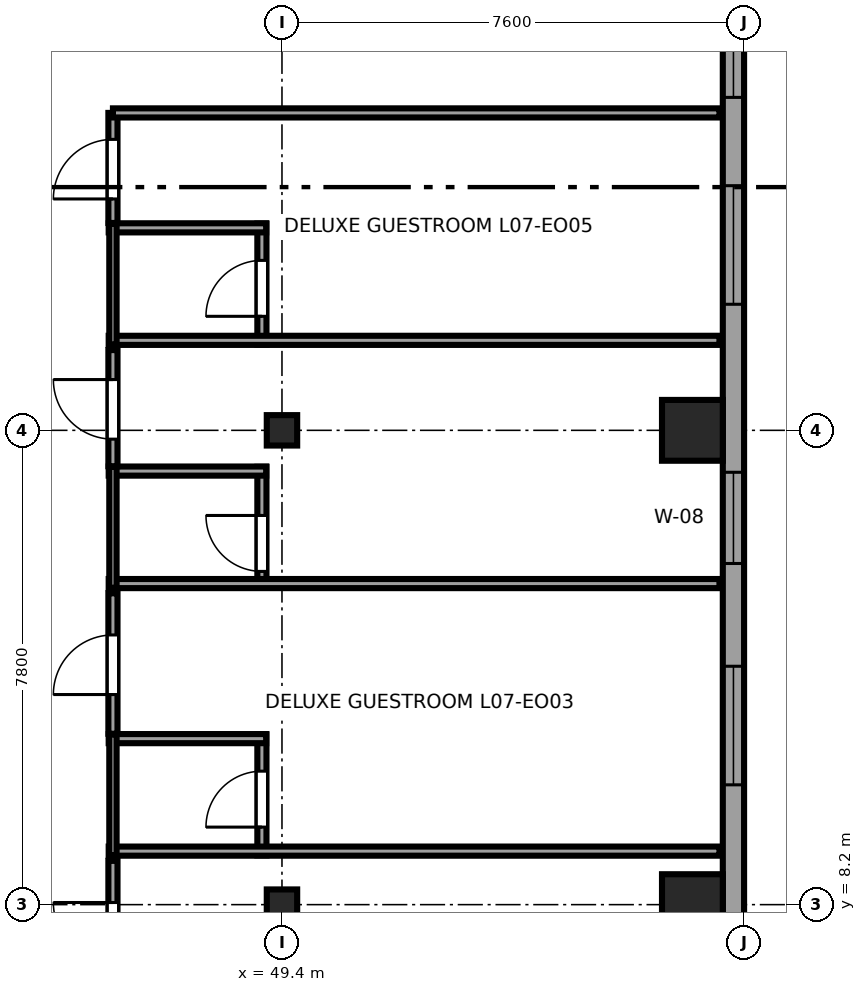
"""IFC4 building model, lengths in metres.
Left out: names, types, materials, properties, quantities, classifications, styles, units other than length and angle.
Written with IfcOpenShell. Run it as: python <this file> out.ifc"""

import sys

from ifc_helpers import new_model, si_unit, direction, frame, frame_2d, origin, origin_2d, place, context, subcontext, project, spatial, rectangle, i_section, extrude, source, transform, mapped, element, fill, save


model = new_model("IFC4")
c1 = context("Model", 3, precision=1e-05, world=origin(), true_north=direction((0.0, 1.0)))
c2 = subcontext(c1, "Body", "Model", "MODEL_VIEW")
j1 = project(units=[si_unit("LENGTHUNIT", "METRE"), si_unit("PLANEANGLEUNIT", "RADIAN")], contexts=[c1])
p1 = place(None, origin())
s1 = spatial("IfcSite", under=j1, at=p1, CompositionType="ELEMENT")
p2 = place(p1, origin())
s2 = spatial("IfcBuilding", under=s1, at=p2, CompositionType="ELEMENT")
p3 = place(p2, frame((0.0, 0.0, 35.55)))
s3 = spatial("IfcBuildingStorey", under=s2, at=p3, CompositionType="ELEMENT", Elevation=35.55)
m1 = source(origin(), c2, "Body", "SweptSolid", [
    extrude(i_section(OverallWidth=0.5, OverallDepth=0.5, WebThickness=0.028, FlangeThickness=0.045, at=origin_2d()), origin(), (0.0, 0.0, 1.0), 3.55),
])
for number, where, z_axis, x_axis in (
    (1, (49.4, 8.2, 0.0), (0.0, 0.0, 1.0), (1.0, 0.0, 0.0)),
    (2, (49.4, 16.0, 0.0), (0.0, 0.0, 1.0), (1.0, 0.0, 0.0)),
):
    element("IfcColumn", number, at=place(p3, frame(where, z_axis=z_axis, x_axis=x_axis)), inside=s3, PredefinedType="COLUMN", context=c2, shape_type="MappedRepresentation", body=[
        mapped(m1, transform((0.0, 0.0, 0.0), x_axis=(1.0, 0.0, 0.0), y_axis=(0.0, 1.0, 0.0), z_axis=(0.0, 0.0, 1.0), scale=1.0)),
    ])
m2 = source(origin(), c2, "Body", "SweptSolid", [
    extrude(rectangle(XDim=1.0, YDim=1.0, at=origin_2d()), origin(), (0.0, 0.0, 1.0), 3.55),
])
for number, where, z_axis, x_axis in (
    (3, (56.15, 8.2, 0.0), (0.0, 0.0, 1.0), (1.0, 0.0, 0.0)),
    (4, (56.15, 16.0, 0.0), (0.0, 0.0, 1.0), (1.0, 0.0, 0.0)),
):
    element("IfcColumn", number, at=place(p3, frame(where, z_axis=z_axis, x_axis=x_axis)), inside=s3, PredefinedType="COLUMN", context=c2, shape_type="MappedRepresentation", body=[
        mapped(m2, transform((0.0, 0.0, 0.0), x_axis=(1.0, 0.0, 0.0), y_axis=(0.0, 1.0, 0.0), z_axis=(0.0, 0.0, 1.0), scale=1.0)),
    ])
p4 = place(p3, frame((56.825, 4.617, 0.0), z_axis=(0.0, 0.0, 1.0), x_axis=(0.0, 1.0, 0.0)))
e5 = element("IfcWall", 5, at=p4, inside=s3, PredefinedType="SOLIDWALL", context=c2, shape_type="SweptSolid", body=[
    extrude(rectangle(XDim=36.766, YDim=0.35, at=frame_2d((18.383, 0.0))), origin(), (0.0, 0.0, 1.0), 3.37),
])
p5 = place(p4, frame((0.551, 0.0, 0.68)))
e6 = element("IfcOpeningElement", 6, at=p5, cuts=e5, PredefinedType="OPENING", context=c2, shape_type="SweptSolid", body=[
    extrude(rectangle(XDim=1.95, YDim=1.82, at=frame_2d((0.975, 0.91))), frame((0.0, 0.185, 0.0), z_axis=(0.0, -1.0, 0.0), x_axis=(1.0, 0.0, 0.0)), (0.0, 0.0, 1.0), 0.37),
])
p6 = place(p4, frame((5.553, 0.0, 0.68)))
e7 = element("IfcOpeningElement", 7, at=p6, cuts=e5, PredefinedType="OPENING", context=c2, shape_type="SweptSolid", body=[
    extrude(rectangle(XDim=1.95, YDim=1.82, at=frame_2d((0.975, 0.91))), frame((0.0, 0.185, 0.0), z_axis=(0.0, -1.0, 0.0), x_axis=(1.0, 0.0, 0.0)), (0.0, 0.0, 1.0), 0.37),
])
p7 = place(p4, frame((13.456, 0.0, 0.68)))
e8 = element("IfcOpeningElement", 8, at=p7, cuts=e5, PredefinedType="OPENING", context=c2, shape_type="SweptSolid", body=[
    extrude(rectangle(XDim=1.95, YDim=1.82, at=frame_2d((0.975, 0.91))), frame((0.0, 0.185, 0.0), z_axis=(0.0, -1.0, 0.0), x_axis=(1.0, 0.0, 0.0)), (0.0, 0.0, 1.0), 0.37),
])
p8 = place(p4, frame((16.858, 0.0, 0.68)))
e9 = element("IfcOpeningElement", 9, at=p8, cuts=e5, PredefinedType="OPENING", context=c2, shape_type="SweptSolid", body=[
    extrude(rectangle(XDim=1.95, YDim=1.82, at=frame_2d((0.975, 0.91))), frame((0.0, 0.185, 0.0), z_axis=(0.0, -1.0, 0.0), x_axis=(1.0, 0.0, 0.0)), (0.0, 0.0, 1.0), 0.37),
])
p9 = place(p4, frame((25.861, 0.0, 0.68)))
e10 = element("IfcOpeningElement", 10, at=p9, cuts=e5, PredefinedType="OPENING", context=c2, shape_type="SweptSolid", body=[
    extrude(rectangle(XDim=1.95, YDim=1.82, at=frame_2d((0.975, 0.91))), frame((0.0, 0.185, 0.0), z_axis=(0.0, -1.0, 0.0), x_axis=(1.0, 0.0, 0.0)), (0.0, 0.0, 1.0), 0.37),
])
p10 = place(p4, frame((30.313, 0.0, 0.68)))
e11 = element("IfcOpeningElement", 11, at=p10, cuts=e5, PredefinedType="OPENING", context=c2, shape_type="SweptSolid", body=[
    extrude(rectangle(XDim=1.95, YDim=1.82, at=frame_2d((0.975, 0.91))), frame((0.0, 0.185, 0.0), z_axis=(0.0, -1.0, 0.0), x_axis=(1.0, 0.0, 0.0)), (0.0, 0.0, 1.0), 0.37),
])
p11 = place(p4, frame((33.215, 0.0, 0.68)))
e12 = element("IfcOpeningElement", 12, at=p11, cuts=e5, PredefinedType="OPENING", context=c2, shape_type="SweptSolid", body=[
    extrude(rectangle(XDim=1.95, YDim=1.82, at=frame_2d((0.975, 0.91))), frame((0.0, 0.185, 0.0), z_axis=(0.0, -1.0, 0.0), x_axis=(1.0, 0.0, 0.0)), (0.0, 0.0, 1.0), 0.37),
])
p12 = place(p4, frame((9.193, 0.0, 0.62)))
e13 = element("IfcOpeningElement", 13, at=p12, cuts=e5, PredefinedType="OPENING", context=c2, shape_type="SweptSolid", body=[
    extrude(rectangle(XDim=1.5, YDim=1.55, at=frame_2d((0.75, 0.775))), frame((0.0, 0.185, 0.0), z_axis=(0.0, -1.0, 0.0), x_axis=(1.0, 0.0, 0.0)), (0.0, 0.0, 1.0), 0.37),
])
p13 = place(p3, frame((49.07, 9.01, 0.0), z_axis=(0.0, 0.0, 1.0), x_axis=(0.0, 1.0, 0.0)))
e14 = element("IfcWall", 14, at=p13, inside=s3, PredefinedType="PARTITIONING", context=c2, shape_type="SweptSolid", body=[
    extrude(rectangle(XDim=1.99, YDim=0.15, at=frame_2d((0.995, 0.0))), origin(), (0.0, 0.0, 1.0), 3.37),
])
p14 = place(p13, frame((0.465, 0.0, 0.0)))
e15 = element("IfcOpeningElement", 15, at=p14, cuts=e14, PredefinedType="OPENING", context=c2, shape_type="SweptSolid", body=[
    extrude(rectangle(XDim=0.92, YDim=2.01, at=frame_2d((0.46, 1.005))), frame((0.0, 0.085, 0.0), z_axis=(0.0, -1.0, 0.0), x_axis=(1.0, 0.0, 0.0)), (0.0, 0.0, 1.0), 0.17),
])
p15 = place(p3, frame((46.55, 9.08, 0.0), z_axis=(0.0, 0.0, 1.0), x_axis=(1.0, 0.0, 0.0)))
e16 = element("IfcWall", 16, at=p15, inside=s3, PredefinedType="PARTITIONING", context=c2, shape_type="SweptSolid", body=[
    extrude(rectangle(XDim=10.045, YDim=0.15, at=frame_2d((5.022, 0.0))), origin(), (0.0, 0.0, 1.0), 3.37),
])
p16 = place(p3, frame((46.55, 10.93, 0.0), z_axis=(0.0, 0.0, 1.0), x_axis=(1.0, 0.0, 0.0)))
e17 = element("IfcWall", 17, at=p16, inside=s3, PredefinedType="PARTITIONING", context=c2, shape_type="SweptSolid", body=[
    extrude(rectangle(XDim=2.59, YDim=0.15, at=frame_2d((1.295, 0.0))), origin(), (0.0, 0.0, 1.0), 3.37),
])
p17 = place(p3, frame((46.62, 9.01, 0.0), z_axis=(0.0, 0.0, 1.0), x_axis=(0.0, 1.0, 0.0)))
e18 = element("IfcWall", 18, at=p17, inside=s3, PredefinedType="PLUMBINGWALL", context=c2, shape_type="SweptSolid", body=[
    extrude(rectangle(XDim=1.99, YDim=0.12, at=frame_2d((0.995, 0.0))), origin(), (0.0, 0.0, 1.0), 3.37),
])
p18 = place(p3, frame((49.07, 13.41, 0.0), z_axis=(0.0, 0.0, 1.0), x_axis=(0.0, 1.0, 0.0)))
e19 = element("IfcWall", 19, at=p18, inside=s3, PredefinedType="PARTITIONING", context=c2, shape_type="SweptSolid", body=[
    extrude(rectangle(XDim=1.99, YDim=0.15, at=frame_2d((0.995, 0.0))), origin(), (0.0, 0.0, 1.0), 3.37),
])
p19 = place(p18, frame((0.27, 0.0, 0.0)))
e20 = element("IfcOpeningElement", 20, at=p19, cuts=e19, PredefinedType="OPENING", context=c2, shape_type="SweptSolid", body=[
    extrude(rectangle(XDim=0.92, YDim=2.01, at=frame_2d((0.46, 1.005))), frame((0.0, 0.085, 0.0), z_axis=(0.0, -1.0, 0.0), x_axis=(1.0, 0.0, 0.0)), (0.0, 0.0, 1.0), 0.17),
])
p20 = place(p3, frame((46.55, 13.48, 0.0), z_axis=(0.0, 0.0, 1.0), x_axis=(1.0, 0.0, 0.0)))
e21 = element("IfcWall", 21, at=p20, inside=s3, PredefinedType="PARTITIONING", context=c2, shape_type="SweptSolid", body=[
    extrude(rectangle(XDim=10.045, YDim=0.15, at=frame_2d((5.022, 0.0))), origin(), (0.0, 0.0, 1.0), 3.37),
])
p21 = place(p3, frame((46.55, 15.33, 0.0), z_axis=(0.0, 0.0, 1.0), x_axis=(1.0, 0.0, 0.0)))
e22 = element("IfcWall", 22, at=p21, inside=s3, PredefinedType="PARTITIONING", context=c2, shape_type="SweptSolid", body=[
    extrude(rectangle(XDim=2.59, YDim=0.15, at=frame_2d((1.295, 0.0))), origin(), (0.0, 0.0, 1.0), 3.37),
])
p22 = place(p3, frame((46.62, 13.41, 0.0), z_axis=(0.0, 0.0, 1.0), x_axis=(0.0, 1.0, 0.0)))
e23 = element("IfcWall", 23, at=p22, inside=s3, PredefinedType="PLUMBINGWALL", context=c2, shape_type="SweptSolid", body=[
    extrude(rectangle(XDim=1.99, YDim=0.12, at=frame_2d((0.995, 0.0))), origin(), (0.0, 0.0, 1.0), 3.37),
])
p23 = place(p3, frame((49.07, 17.41, 0.0), z_axis=(0.0, 0.0, 1.0), x_axis=(0.0, 1.0, 0.0)))
e24 = element("IfcWall", 24, at=p23, inside=s3, PredefinedType="PARTITIONING", context=c2, shape_type="SweptSolid", body=[
    extrude(rectangle(XDim=1.99, YDim=0.15, at=frame_2d((0.995, 0.0))), origin(), (0.0, 0.0, 1.0), 3.37),
])
p24 = place(p23, frame((0.465, 0.0, 0.0)))
e25 = element("IfcOpeningElement", 25, at=p24, cuts=e24, PredefinedType="OPENING", context=c2, shape_type="SweptSolid", body=[
    extrude(rectangle(XDim=0.92, YDim=2.01, at=frame_2d((0.46, 1.005))), frame((0.0, 0.085, 0.0), z_axis=(0.0, -1.0, 0.0), x_axis=(1.0, 0.0, 0.0)), (0.0, 0.0, 1.0), 0.17),
])
p25 = place(p3, frame((46.55, 17.48, 0.0), z_axis=(0.0, 0.0, 1.0), x_axis=(1.0, 0.0, 0.0)))
e26 = element("IfcWall", 26, at=p25, inside=s3, PredefinedType="PARTITIONING", context=c2, shape_type="SweptSolid", body=[
    extrude(rectangle(XDim=10.045, YDim=0.15, at=frame_2d((5.022, 0.0))), origin(), (0.0, 0.0, 1.0), 3.37),
])
p26 = place(p3, frame((46.55, 19.33, 0.0), z_axis=(0.0, 0.0, 1.0), x_axis=(1.0, 0.0, 0.0)))
e27 = element("IfcWall", 27, at=p26, inside=s3, PredefinedType="PARTITIONING", context=c2, shape_type="SweptSolid", body=[
    extrude(rectangle(XDim=2.59, YDim=0.15, at=frame_2d((1.295, 0.0))), origin(), (0.0, 0.0, 1.0), 3.37),
])
p27 = place(p3, frame((46.62, 17.41, 0.0), z_axis=(0.0, 0.0, 1.0), x_axis=(0.0, 1.0, 0.0)))
e28 = element("IfcWall", 28, at=p27, inside=s3, PredefinedType="PLUMBINGWALL", context=c2, shape_type="SweptSolid", body=[
    extrude(rectangle(XDim=1.99, YDim=0.12, at=frame_2d((0.995, 0.0))), origin(), (0.0, 0.0, 1.0), 3.37),
])
p28 = place(p3, frame((46.62, 6.61, 0.0), z_axis=(0.0, 0.0, 1.0), x_axis=(0.0, 1.0, 0.0)))
e29 = element("IfcWall", 29, at=p28, inside=s3, PredefinedType="PARTITIONING", context=c2, shape_type="SweptSolid", body=[
    extrude(rectangle(XDim=2.31, YDim=0.15, at=frame_2d((1.155, 0.0))), origin(), (0.0, 0.0, 1.0), 3.37),
])
p29 = place(p28, frame((0.645, 0.0, 0.0)))
e30 = element("IfcOpeningElement", 30, at=p29, cuts=e29, PredefinedType="OPENING", context=c2, shape_type="SweptSolid", body=[
    extrude(rectangle(XDim=0.98, YDim=2.12, at=frame_2d((0.49, 1.06))), frame((0.0, 0.085, 0.0), z_axis=(0.0, -1.0, 0.0), x_axis=(1.0, 0.0, 0.0)), (0.0, 0.0, 1.0), 0.17),
])
p30 = place(p3, frame((46.62, 11.01, 0.0), z_axis=(0.0, 0.0, 1.0), x_axis=(0.0, 1.0, 0.0)))
e31 = element("IfcWall", 31, at=p30, inside=s3, PredefinedType="PARTITIONING", context=c2, shape_type="SweptSolid", body=[
    extrude(rectangle(XDim=2.31, YDim=0.15, at=frame_2d((1.155, 0.0))), origin(), (0.0, 0.0, 1.0), 3.37),
])
p31 = place(p30, frame((0.645, 0.0, 0.0)))
e32 = element("IfcOpeningElement", 32, at=p31, cuts=e31, PredefinedType="OPENING", context=c2, shape_type="SweptSolid", body=[
    extrude(rectangle(XDim=0.98, YDim=2.12, at=frame_2d((0.49, 1.06))), frame((0.0, 0.085, 0.0), z_axis=(0.0, -1.0, 0.0), x_axis=(1.0, 0.0, 0.0)), (0.0, 0.0, 1.0), 0.17),
])
p32 = place(p3, frame((46.62, 15.41, 0.0), z_axis=(0.0, 0.0, 1.0), x_axis=(0.0, 1.0, 0.0)))
e33 = element("IfcWall", 33, at=p32, inside=s3, PredefinedType="PARTITIONING", context=c2, shape_type="SweptSolid", body=[
    extrude(rectangle(XDim=1.91, YDim=0.15, at=frame_2d((0.955, 0.0))), origin(), (0.0, 0.0, 1.0), 3.37),
])
p33 = place(p32, frame((0.445, 0.0, 0.0)))
e34 = element("IfcOpeningElement", 34, at=p33, cuts=e33, PredefinedType="OPENING", context=c2, shape_type="SweptSolid", body=[
    extrude(rectangle(XDim=0.98, YDim=2.12, at=frame_2d((0.49, 1.06))), frame((0.0, 0.085, 0.0), z_axis=(0.0, -1.0, 0.0), x_axis=(1.0, 0.0, 0.0)), (0.0, 0.0, 1.0), 0.17),
])
p34 = place(p3, frame((46.62, 19.41, 0.0), z_axis=(0.0, 0.0, 1.0), x_axis=(0.0, 1.0, 0.0)))
e35 = element("IfcWall", 35, at=p34, inside=s3, PredefinedType="PARTITIONING", context=c2, shape_type="SweptSolid", body=[
    extrude(rectangle(XDim=1.81, YDim=0.15, at=frame_2d((0.905, 0.0))), origin(), (0.0, 0.0, 1.0), 3.37),
])
p35 = place(p34, frame((0.395, 0.0, 0.0)))
e36 = element("IfcOpeningElement", 36, at=p35, cuts=e35, PredefinedType="OPENING", context=c2, shape_type="SweptSolid", body=[
    extrude(rectangle(XDim=0.98, YDim=2.12, at=frame_2d((0.49, 1.06))), frame((0.0, 0.085, 0.0), z_axis=(0.0, -1.0, 0.0), x_axis=(1.0, 0.0, 0.0)), (0.0, 0.0, 1.0), 0.17),
])
p36 = place(p3, frame((46.62, 21.22, 0.0), z_axis=(0.0, 0.0, 1.0), x_axis=(1.0, 0.0, 0.0)))
e37 = element("IfcWall", 37, at=p36, inside=s3, PredefinedType="PARTITIONING", context=c2, shape_type="SweptSolid", body=[
    extrude(rectangle(XDim=9.975, YDim=0.15, at=frame_2d((4.987, 0.0))), origin(), (0.0, 0.0, 1.0), 3.37),
])
m3 = source(origin(), c2, "Body", "SweptSolid", [
    extrude(rectangle(XDim=1.95, YDim=1.82, at=frame_2d((0.975, 0.91))), frame((0.0, 0.09, 0.0), z_axis=(0.0, -1.0, 0.0), x_axis=(1.0, 0.0, 0.0)), (0.0, 0.0, 1.0), 0.06),
])
p37 = place(p6, origin())
e38 = element("IfcWindow", 38, at=p37, inside=s3, PartitioningType="DOUBLE_PANEL_VERTICAL", PredefinedType="WINDOW", context=c2, shape_type="MappedRepresentation", body=[
    mapped(m3, transform((0.0, 0.0, 0.0), x_axis=(1.0, 0.0, 0.0), y_axis=(0.0, 1.0, 0.0), z_axis=(0.0, 0.0, 1.0), scale=1.0)),
])
fill(e7, e38)
p38 = place(p7, origin())
e39 = element("IfcWindow", 39, at=p38, inside=s3, PartitioningType="DOUBLE_PANEL_VERTICAL", PredefinedType="WINDOW", context=c2, shape_type="MappedRepresentation", body=[
    mapped(m3, transform((0.0, 0.0, 0.0), x_axis=(1.0, 0.0, 0.0), y_axis=(0.0, 1.0, 0.0), z_axis=(0.0, 0.0, 1.0), scale=1.0)),
])
fill(e8, e39)
p39 = place(p8, origin())
e40 = element("IfcWindow", 40, at=p39, inside=s3, PartitioningType="DOUBLE_PANEL_VERTICAL", PredefinedType="WINDOW", context=c2, shape_type="MappedRepresentation", body=[
    mapped(m3, transform((0.0, 0.0, 0.0), x_axis=(1.0, 0.0, 0.0), y_axis=(0.0, 1.0, 0.0), z_axis=(0.0, 0.0, 1.0), scale=1.0)),
])
fill(e9, e40)
m4 = source(origin(), c2, "Body", "SweptSolid", [
    extrude(rectangle(XDim=1.5, YDim=1.55, at=frame_2d((0.75, 0.775))), frame((0.0, 0.09, 0.0), z_axis=(0.0, -1.0, 0.0), x_axis=(1.0, 0.0, 0.0)), (0.0, 0.0, 1.0), 0.06),
])
p40 = place(p12, origin())
e41 = element("IfcWindow", 41, at=p40, inside=s3, PartitioningType="SINGLE_PANEL", PredefinedType="WINDOW", context=c2, shape_type="MappedRepresentation", body=[
    mapped(m4, transform((0.0, 0.0, 0.0), x_axis=(1.0, 0.0, 0.0), y_axis=(0.0, 1.0, 0.0), z_axis=(0.0, 0.0, 1.0), scale=1.0)),
])
fill(e13, e41)
m5 = source(origin(), c2, "Body", "SweptSolid", [
    extrude(rectangle(XDim=0.92, YDim=2.01, at=frame_2d((0.46, 1.005))), frame((0.0, 0.025, 0.0), z_axis=(0.0, -1.0, 0.0), x_axis=(1.0, 0.0, 0.0)), (0.0, 0.0, 1.0), 0.05),
])
p41 = place(p14, origin())
e42 = element("IfcDoor", 42, at=p41, inside=s3, OperationType="SINGLE_SWING_LEFT", PredefinedType="DOOR", context=c2, shape_type="MappedRepresentation", body=[
    mapped(m5, transform((0.0, 0.0, 0.0), x_axis=(1.0, 0.0, 0.0), y_axis=(0.0, 1.0, 0.0), z_axis=(0.0, 0.0, 1.0), scale=1.0)),
])
fill(e15, e42)
p42 = place(p19, origin())
e43 = element("IfcDoor", 43, at=p42, inside=s3, OperationType="SINGLE_SWING_RIGHT", PredefinedType="DOOR", context=c2, shape_type="MappedRepresentation", body=[
    mapped(m5, transform((0.0, 0.0, 0.0), x_axis=(1.0, 0.0, 0.0), y_axis=(0.0, 1.0, 0.0), z_axis=(0.0, 0.0, 1.0), scale=1.0)),
])
fill(e20, e43)
p43 = place(p24, origin())
e44 = element("IfcDoor", 44, at=p43, inside=s3, OperationType="SINGLE_SWING_LEFT", PredefinedType="DOOR", context=c2, shape_type="MappedRepresentation", body=[
    mapped(m5, transform((0.0, 0.0, 0.0), x_axis=(1.0, 0.0, 0.0), y_axis=(0.0, 1.0, 0.0), z_axis=(0.0, 0.0, 1.0), scale=1.0)),
])
fill(e25, e44)
m6 = source(origin(), c2, "Body", "SweptSolid", [
    extrude(rectangle(XDim=0.98, YDim=2.12, at=frame_2d((0.49, 1.06))), frame((0.0, 0.025, 0.0), z_axis=(0.0, -1.0, 0.0), x_axis=(1.0, 0.0, 0.0)), (0.0, 0.0, 1.0), 0.05),
])
p44 = place(p29, origin())
e45 = element("IfcDoor", 45, at=p44, inside=s3, OperationType="SINGLE_SWING_RIGHT", PredefinedType="DOOR", context=c2, shape_type="MappedRepresentation", body=[
    mapped(m6, transform((0.0, 0.0, 0.0), x_axis=(1.0, 0.0, 0.0), y_axis=(0.0, 1.0, 0.0), z_axis=(0.0, 0.0, 1.0), scale=1.0)),
])
fill(e30, e45)
p45 = place(p31, origin())
e46 = element("IfcDoor", 46, at=p45, inside=s3, OperationType="SINGLE_SWING_LEFT", PredefinedType="DOOR", context=c2, shape_type="MappedRepresentation", body=[
    mapped(m6, transform((0.0, 0.0, 0.0), x_axis=(1.0, 0.0, 0.0), y_axis=(0.0, 1.0, 0.0), z_axis=(0.0, 0.0, 1.0), scale=1.0)),
])
fill(e32, e46)
p46 = place(p33, origin())
e47 = element("IfcDoor", 47, at=p46, inside=s3, OperationType="SINGLE_SWING_RIGHT", PredefinedType="DOOR", context=c2, shape_type="MappedRepresentation", body=[
    mapped(m6, transform((0.0, 0.0, 0.0), x_axis=(1.0, 0.0, 0.0), y_axis=(0.0, 1.0, 0.0), z_axis=(0.0, 0.0, 1.0), scale=1.0)),
])
fill(e34, e47)
p47 = place(p35, origin())
e48 = element("IfcDoor", 48, at=p47, inside=s3, OperationType="SINGLE_SWING_LEFT", PredefinedType="DOOR", context=c2, shape_type="MappedRepresentation", body=[
    mapped(m6, transform((0.0, 0.0, 0.0), x_axis=(1.0, 0.0, 0.0), y_axis=(0.0, 1.0, 0.0), z_axis=(0.0, 0.0, 1.0), scale=1.0)),
])
fill(e36, e48)
save(model, sys.argv[1])
